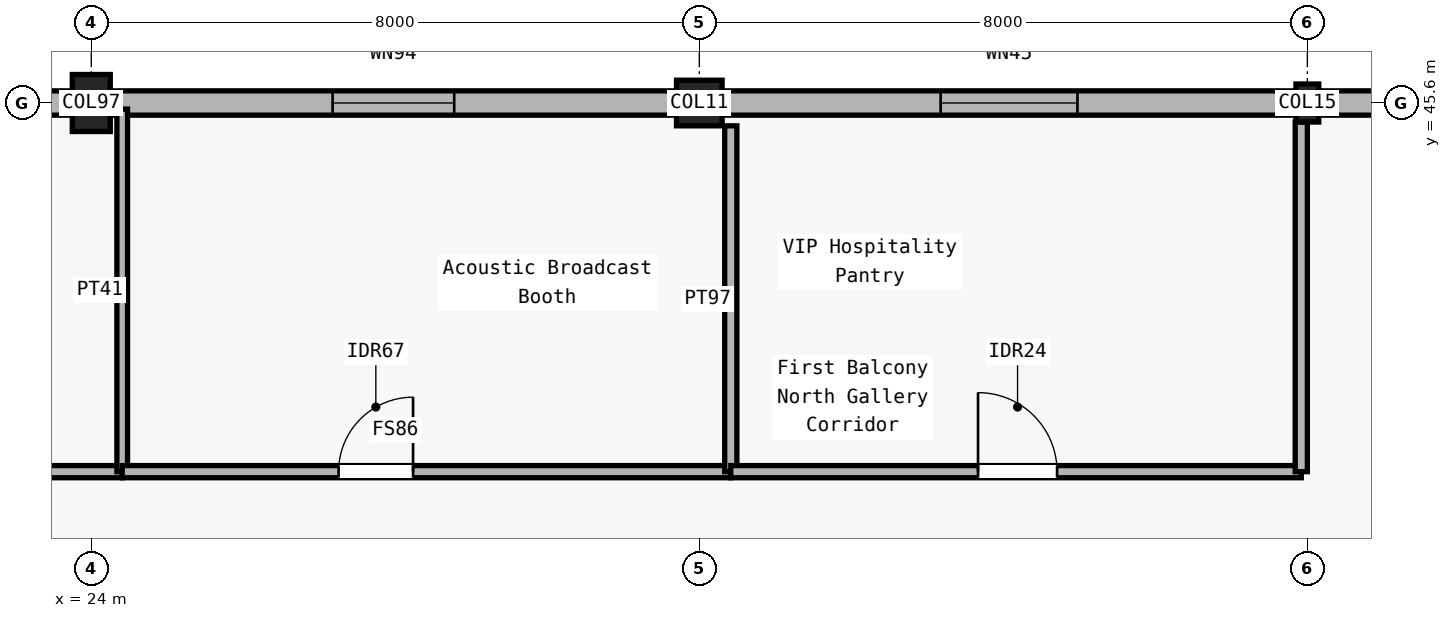
"""IFC4 building model, lengths in metres.
Left out: names, types, materials, properties, quantities, classifications, styles, units other than length and angle.
Written with IfcOpenShell. Run it as: python <this file> out.ifc"""

import sys

from ifc_helpers import new_model, si_unit, direction, frame, frame_2d, origin, origin_2d, place, context, subcontext, project, spatial, rectangle, i_section, extrude, element, fill, save


model = new_model("IFC4")
c1 = context("Model", 3, precision=1e-05, world=origin(), true_north=direction((0.0, 1.0)))
c2 = subcontext(c1, "Body", "Model", "MODEL_VIEW")
j1 = project(units=[si_unit("LENGTHUNIT", "METRE"), si_unit("PLANEANGLEUNIT", "RADIAN")], contexts=[c1])
p1 = place(None, origin())
s1 = spatial("IfcSite", under=j1, at=p1, CompositionType="ELEMENT")
p2 = place(p1, origin())
s2 = spatial("IfcBuilding", under=s1, at=p2, CompositionType="ELEMENT")
p3 = place(p2, frame((0.0, 0.0, 5.4)))
s3 = spatial("IfcBuildingStorey", under=s2, at=p3, CompositionType="ELEMENT", Elevation=5.4)
p4 = place(p3, frame((24.0, 45.6, 0.0), z_axis=(0.0, 0.0, 1.0), x_axis=(1.0, 0.0, 0.0)))
e1 = element("IfcColumn", 1, at=p4, inside=s3, PredefinedType="COLUMN", context=c2, shape_type="SweptSolid", body=[
    extrude(rectangle(XDim=0.5, YDim=0.75, at=origin_2d()), origin(), (0.0, 0.0, 1.0), 4.8),
])
p5 = place(p3, frame((32.0, 45.6, 0.0), z_axis=(0.0, 0.0, 1.0), x_axis=(1.0, 0.0, 0.0)))
e2 = element("IfcColumn", 2, at=p5, inside=s3, PredefinedType="COLUMN", context=c2, shape_type="SweptSolid", body=[
    extrude(rectangle(XDim=0.6, YDim=0.6, at=origin_2d()), origin(), (0.0, 0.0, 1.0), 4.8),
])
p6 = place(p3, frame((40.0, 45.6, 0.0), z_axis=(0.0, 0.0, 1.0), x_axis=(1.0, 0.0, 0.0)))
e3 = element("IfcColumn", 3, at=p6, inside=s3, PredefinedType="COLUMN", context=c2, shape_type="SweptSolid", body=[
    extrude(i_section(OverallWidth=0.3, OverallDepth=0.5, WebThickness=0.014, FlangeThickness=0.028, FilletRadius=0.027, at=origin_2d()), origin(), (0.0, 0.0, 1.0), 4.8),
])
p7 = place(p3, frame((16.3, 45.6, 0.0), z_axis=(0.0, 0.0, 1.0), x_axis=(1.0, 0.0, 0.0)))
e4 = element("IfcWall", 4, at=p7, inside=s3, PredefinedType="SOLIDWALL", context=c2, shape_type="SweptSolid", body=[
    extrude(rectangle(XDim=7.45, YDim=0.32, at=frame_2d((3.725, 0.0))), origin(), (0.0, 0.0, 1.0), 3.85),
])
p8 = place(p7, frame((3.025, 0.0, 0.95)))
e5 = element("IfcOpeningElement", 5, at=p8, cuts=e4, PredefinedType="OPENING", context=c2, shape_type="SweptSolid", body=[
    extrude(rectangle(XDim=1.4, YDim=1.95, at=frame_2d((0.7, 0.975))), frame((0.0, 0.17, 0.0), z_axis=(0.0, -1.0, 0.0), x_axis=(1.0, 0.0, 0.0)), (0.0, 0.0, 1.0), 0.34),
])
p9 = place(p3, frame((24.25, 45.6, 0.0), z_axis=(0.0, 0.0, 1.0), x_axis=(1.0, 0.0, 0.0)))
e6 = element("IfcWall", 6, at=p9, inside=s3, PredefinedType="SOLIDWALL", context=c2, shape_type="SweptSolid", body=[
    extrude(rectangle(XDim=7.45, YDim=0.32, at=frame_2d((3.725, 0.0))), origin(), (0.0, 0.0, 1.0), 3.9),
])
p10 = place(p9, frame((2.925, 0.0, 0.95)))
e7 = element("IfcOpeningElement", 7, at=p10, cuts=e6, PredefinedType="OPENING", context=c2, shape_type="SweptSolid", body=[
    extrude(rectangle(XDim=1.6, YDim=1.95, at=frame_2d((0.8, 0.975))), frame((0.0, 0.17, 0.0), z_axis=(0.0, -1.0, 0.0), x_axis=(1.0, 0.0, 0.0)), (0.0, 0.0, 1.0), 0.34),
])
p11 = place(p3, frame((32.3, 45.6, 0.0), z_axis=(0.0, 0.0, 1.0), x_axis=(1.0, 0.0, 0.0)))
e8 = element("IfcWall", 8, at=p11, inside=s3, PredefinedType="SOLIDWALL", context=c2, shape_type="SweptSolid", body=[
    extrude(rectangle(XDim=7.55, YDim=0.32, at=frame_2d((3.775, 0.0))), origin(), (0.0, 0.0, 1.0), 3.4),
])
p12 = place(p11, frame((2.875, 0.0, 0.95)))
e9 = element("IfcOpeningElement", 9, at=p12, cuts=e8, PredefinedType="OPENING", context=c2, shape_type="SweptSolid", body=[
    extrude(rectangle(XDim=1.8, YDim=1.95, at=frame_2d((0.9, 0.975))), frame((0.0, 0.17, 0.0), z_axis=(0.0, -1.0, 0.0), x_axis=(1.0, 0.0, 0.0)), (0.0, 0.0, 1.0), 0.34),
])
p13 = place(p3, frame((40.15, 45.6, 0.0), z_axis=(0.0, 0.0, 1.0), x_axis=(1.0, 0.0, 0.0)))
e10 = element("IfcWall", 10, at=p13, inside=s3, PredefinedType="SOLIDWALL", context=c2, shape_type="SweptSolid", body=[
    extrude(rectangle(XDim=9.3, YDim=0.32, at=frame_2d((4.65, 0.0))), origin(), (0.0, 0.0, 1.0), 3.4),
])
p14 = place(p3, frame((16.0, 40.75, 0.0), z_axis=(0.0, 0.0, 1.0), x_axis=(1.0, 0.0, 0.0)))
e11 = element("IfcWall", 11, at=p14, inside=s3, PredefinedType="PARTITIONING", context=c2, shape_type="SweptSolid", body=[
    extrude(rectangle(XDim=8.407, YDim=0.16, at=frame_2d((4.204, 0.0))), origin(), (0.0, 0.0, 1.0), 3.81),
])
p15 = place(p14, frame((3.704, 0.0, 0.0)))
e12 = element("IfcOpeningElement", 12, at=p15, cuts=e11, PredefinedType="OPENING", context=c2, shape_type="SweptSolid", body=[
    extrude(rectangle(XDim=0.92, YDim=2.15, at=frame_2d((0.46, 1.075))), frame((0.0, 0.09, 0.0), z_axis=(0.0, -1.0, 0.0), x_axis=(1.0, 0.0, 0.0)), (0.0, 0.0, 1.0), 0.18),
])
p16 = place(p3, frame((24.407, 40.75, 0.0), z_axis=(0.0, 0.0, 1.0), x_axis=(0.0, 1.0, 0.0)))
e13 = element("IfcWall", 13, at=p16, inside=s3, PredefinedType="PARTITIONING", context=c2, shape_type="SweptSolid", body=[
    extrude(rectangle(XDim=4.77, YDim=0.14, at=frame_2d((2.385, 0.0))), origin(), (0.0, 0.0, 1.0), 3.81),
])
p17 = place(p3, frame((24.407, 40.75, 0.0), z_axis=(0.0, 0.0, 1.0), x_axis=(1.0, 0.0, 0.0)))
e14 = element("IfcWall", 14, at=p17, inside=s3, PredefinedType="PARTITIONING", context=c2, shape_type="SweptSolid", body=[
    extrude(rectangle(XDim=8.007, YDim=0.16, at=frame_2d((4.003, 0.0))), origin(), (0.0, 0.0, 1.0), 3.81),
])
p18 = place(p17, frame((2.847, 0.0, 0.0)))
e15 = element("IfcOpeningElement", 15, at=p18, cuts=e14, PredefinedType="OPENING", context=c2, shape_type="SweptSolid", body=[
    extrude(rectangle(XDim=0.98, YDim=2.15, at=frame_2d((0.49, 1.075))), frame((0.0, 0.09, 0.0), z_axis=(0.0, -1.0, 0.0), x_axis=(1.0, 0.0, 0.0)), (0.0, 0.0, 1.0), 0.18),
])
p19 = place(p3, frame((32.414, 40.75, 0.0), z_axis=(0.0, 0.0, 1.0), x_axis=(0.0, 1.0, 0.0)))
e16 = element("IfcWall", 16, at=p19, inside=s3, PredefinedType="PARTITIONING", context=c2, shape_type="SweptSolid", body=[
    extrude(rectangle(XDim=4.55, YDim=0.16, at=frame_2d((2.275, 0.0))), origin(), (0.0, 0.0, 1.0), 3.76),
])
p20 = place(p3, frame((32.414, 40.75, 0.0), z_axis=(0.0, 0.0, 1.0), x_axis=(1.0, 0.0, 0.0)))
e17 = element("IfcWall", 17, at=p20, inside=s3, PredefinedType="PARTITIONING", context=c2, shape_type="SweptSolid", body=[
    extrude(rectangle(XDim=7.506, YDim=0.16, at=frame_2d((3.753, 0.0))), origin(), (0.0, 0.0, 1.0), 3.865),
])
p21 = place(p20, frame((3.253, 0.0, 0.0)))
e18 = element("IfcOpeningElement", 18, at=p21, cuts=e17, PredefinedType="OPENING", context=c2, shape_type="SweptSolid", body=[
    extrude(rectangle(XDim=1.04, YDim=2.15, at=frame_2d((0.52, 1.075))), frame((0.0, 0.09, 0.0), z_axis=(0.0, -1.0, 0.0), x_axis=(1.0, 0.0, 0.0)), (0.0, 0.0, 1.0), 0.18),
])
p22 = place(p3, frame((39.92, 40.75, 0.0), z_axis=(0.0, 0.0, 1.0), x_axis=(0.0, 1.0, 0.0)))
e19 = element("IfcWall", 19, at=p22, inside=s3, PredefinedType="PARTITIONING", context=c2, shape_type="SweptSolid", body=[
    extrude(rectangle(XDim=4.6, YDim=0.16, at=frame_2d((2.3, 0.0))), origin(), (0.0, 0.0, 1.0), 3.4),
])
p23 = place(p10, origin())
e20 = element("IfcWindow", 20, at=p23, inside=s3, PartitioningType="SINGLE_PANEL", PredefinedType="WINDOW", context=c2, shape_type="SweptSolid", body=[
    extrude(rectangle(XDim=1.6, YDim=1.95, at=frame_2d((0.8, 0.975))), frame((0.0, 0.03, 0.0), z_axis=(0.0, -1.0, 0.0), x_axis=(1.0, 0.0, 0.0)), (0.0, 0.0, 1.0), 0.06),
])
fill(e7, e20)
p24 = place(p12, origin())
e21 = element("IfcWindow", 21, at=p24, inside=s3, PartitioningType="DOUBLE_PANEL_VERTICAL", PredefinedType="WINDOW", context=c2, shape_type="SweptSolid", body=[
    extrude(rectangle(XDim=1.8, YDim=1.95, at=frame_2d((0.9, 0.975))), frame((0.0, 0.03, 0.0), z_axis=(0.0, -1.0, 0.0), x_axis=(1.0, 0.0, 0.0)), (0.0, 0.0, 1.0), 0.06),
])
fill(e9, e21)
p25 = place(p18, origin())
e22 = element("IfcDoor", 22, at=p25, inside=s3, OperationType="SINGLE_SWING_RIGHT", PredefinedType="DOOR", context=c2, shape_type="SweptSolid", body=[
    extrude(rectangle(XDim=0.98, YDim=2.15, at=frame_2d((0.49, 1.075))), frame((0.0, 0.025, 0.0), z_axis=(0.0, -1.0, 0.0), x_axis=(1.0, 0.0, 0.0)), (0.0, 0.0, 1.0), 0.05),
])
fill(e15, e22)
p26 = place(p21, origin())
e23 = element("IfcDoor", 23, at=p26, inside=s3, OperationType="SINGLE_SWING_LEFT", PredefinedType="DOOR", context=c2, shape_type="SweptSolid", body=[
    extrude(rectangle(XDim=1.04, YDim=2.15, at=frame_2d((0.52, 1.075))), frame((0.0, 0.025, 0.0), z_axis=(0.0, -1.0, 0.0), x_axis=(1.0, 0.0, 0.0)), (0.0, 0.0, 1.0), 0.05),
])
fill(e18, e23)
save(model, sys.argv[1])
